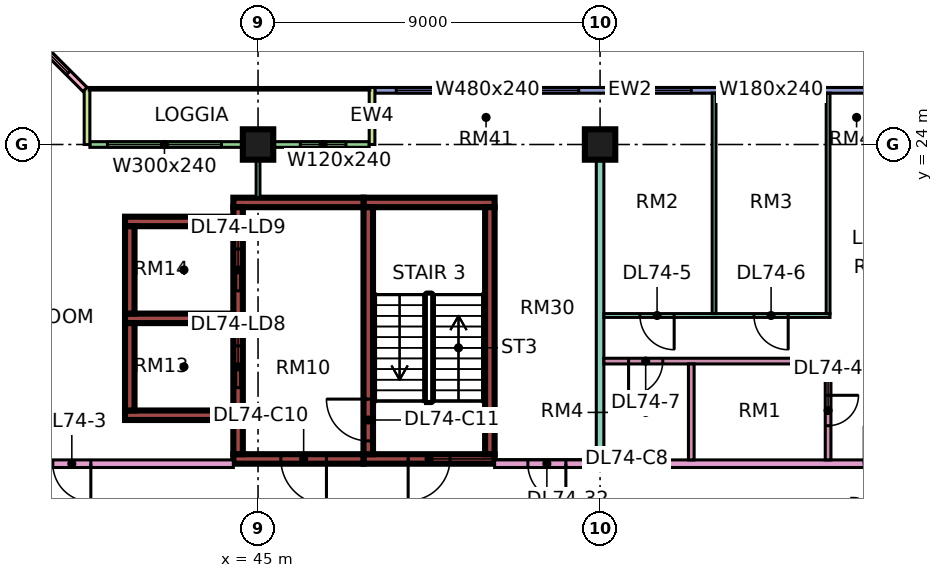
"""IFC4 building model, lengths in metres.
Left out: names, types, materials, properties, quantities, classifications, styles, units other than length and angle.
Written with IfcOpenShell. Run it as: python <this file> out.ifc"""

import sys

from ifc_helpers import new_model, si_unit, direction, frame, frame_2d, origin, origin_2d, place, context, subcontext, project, spatial, rectangle, extrude, element, fill, save


model = new_model("IFC4")
c1 = context("Model", 3, precision=1e-05, world=origin(), true_north=direction((0.0, 1.0)))
c2 = subcontext(c1, "Body", "Model", "MODEL_VIEW")
j1 = project(units=[si_unit("LENGTHUNIT", "METRE"), si_unit("PLANEANGLEUNIT", "RADIAN")], contexts=[c1])
p1 = place(None, origin())
s1 = spatial("IfcSite", under=j1, at=p1, CompositionType="ELEMENT")
p2 = place(p1, origin())
s2 = spatial("IfcBuilding", under=s1, at=p2, CompositionType="ELEMENT")
p3 = place(p2, frame((0.0, 0.0, 314.65)))
s3 = spatial("IfcBuildingStorey", under=s2, at=p3, CompositionType="ELEMENT", Elevation=314.65)
for number, where, z_axis, x_axis in (
    (1, (45.0, 24.0, 0.0), (0.0, 0.0, 1.0), (1.0, 0.0, 0.0)),
    (2, (54.0, 24.0, 0.0), (0.0, 0.0, 1.0), (1.0, 0.0, 0.0)),
):
    element("IfcColumn", number, at=place(p3, frame(where, z_axis=z_axis, x_axis=x_axis)), inside=s3, PredefinedType="COLUMN", context=c2, shape_type="SweptSolid", body=[
        extrude(rectangle(XDim=0.8, YDim=0.8, at=origin_2d()), origin(), (0.0, 0.0, 1.0), 3.75),
    ])
p4 = place(p3, frame((47.775, 15.725, 0.0), z_axis=(0.0, 0.0, 1.0), x_axis=(1.0, 0.0, 0.0)))
e3 = element("IfcWall", 3, at=p4, inside=s3, PredefinedType="SHEAR", context=c2, shape_type="SweptSolid", body=[
    extrude(rectangle(XDim=3.45, YDim=0.25, at=frame_2d((1.725, 0.0))), origin(), (0.0, 0.0, 1.0), 3.75),
])
p5 = place(p4, frame((1.175, 0.0, 0.0)))
e4 = element("IfcOpeningElement", 4, at=p5, cuts=e3, PredefinedType="OPENING", context=c2, shape_type="SweptSolid", body=[
    extrude(rectangle(XDim=1.1, YDim=2.2, at=frame_2d((0.55, 1.1))), frame((0.0, 0.135, 0.0), z_axis=(0.0, -1.0, 0.0), x_axis=(1.0, 0.0, 0.0)), (0.0, 0.0, 1.0), 0.27),
])
p6 = place(p3, frame((47.775, 22.475, 0.0), z_axis=(0.0, 0.0, 1.0), x_axis=(1.0, 0.0, 0.0)))
e5 = element("IfcWall", 5, at=p6, inside=s3, PredefinedType="SHEAR", context=c2, shape_type="SweptSolid", body=[
    extrude(rectangle(XDim=3.45, YDim=0.25, at=frame_2d((1.725, 0.0))), origin(), (0.0, 0.0, 1.0), 3.75),
])
p7 = place(p3, frame((47.9, 15.85, 0.0), z_axis=(0.0, 0.0, 1.0), x_axis=(0.0, 1.0, 0.0)))
e6 = element("IfcWall", 6, at=p7, inside=s3, PredefinedType="SHEAR", context=c2, shape_type="SweptSolid", body=[
    extrude(rectangle(XDim=6.5, YDim=0.25, at=frame_2d((3.25, 0.0))), origin(), (0.0, 0.0, 1.0), 3.75),
])
p8 = place(p7, frame((0.35, 0.0, 0.0)))
e7 = element("IfcOpeningElement", 7, at=p8, cuts=e6, PredefinedType="OPENING", context=c2, shape_type="SweptSolid", body=[
    extrude(rectangle(XDim=1.1, YDim=2.2, at=frame_2d((0.55, 1.1))), frame((0.0, 0.135, 0.0), z_axis=(0.0, -1.0, 0.0), x_axis=(1.0, 0.0, 0.0)), (0.0, 0.0, 1.0), 0.27),
])
p9 = place(p3, frame((51.1, 15.85, 0.0), z_axis=(0.0, 0.0, 1.0), x_axis=(0.0, 1.0, 0.0)))
e8 = element("IfcWall", 8, at=p9, inside=s3, PredefinedType="SHEAR", context=c2, shape_type="SweptSolid", body=[
    extrude(rectangle(XDim=6.5, YDim=0.25, at=frame_2d((3.25, 0.0))), origin(), (0.0, 0.0, 1.0), 3.75),
])
p10 = place(p3, frame((44.35, 15.725, 0.0), z_axis=(0.0, 0.0, 1.0), x_axis=(1.0, 0.0, 0.0)))
e9 = element("IfcWall", 9, at=p10, inside=s3, PredefinedType="SHEAR", context=c2, shape_type="SweptSolid", body=[
    extrude(rectangle(XDim=3.425, YDim=0.25, at=frame_2d((1.712, 0.0))), origin(), (0.0, 0.0, 1.0), 3.75),
])
p11 = place(p10, frame((1.25, 0.0, 0.0)))
e10 = element("IfcOpeningElement", 10, at=p11, cuts=e9, PredefinedType="OPENING", context=c2, shape_type="SweptSolid", body=[
    extrude(rectangle(XDim=1.2, YDim=2.2, at=frame_2d((0.6, 1.1))), frame((0.0, 0.135, 0.0), z_axis=(0.0, -1.0, 0.0), x_axis=(1.0, 0.0, 0.0)), (0.0, 0.0, 1.0), 0.27),
])
p12 = place(p3, frame((44.35, 22.475, 0.0), z_axis=(0.0, 0.0, 1.0), x_axis=(1.0, 0.0, 0.0)))
e11 = element("IfcWall", 11, at=p12, inside=s3, PredefinedType="SHEAR", context=c2, shape_type="SweptSolid", body=[
    extrude(rectangle(XDim=3.425, YDim=0.25, at=frame_2d((1.712, 0.0))), origin(), (0.0, 0.0, 1.0), 3.75),
])
p13 = place(p3, frame((44.475, 15.85, 0.0), z_axis=(0.0, 0.0, 1.0), x_axis=(0.0, 1.0, 0.0)))
e12 = element("IfcWall", 12, at=p13, inside=s3, PredefinedType="SHEAR", context=c2, shape_type="SweptSolid", body=[
    extrude(rectangle(XDim=6.5, YDim=0.25, at=frame_2d((3.25, 0.0))), origin(), (0.0, 0.0, 1.0), 3.75),
])
p14 = place(p13, frame((1.75, 0.0, 0.0)))
e13 = element("IfcOpeningElement", 13, at=p14, cuts=e12, PredefinedType="OPENING", context=c2, shape_type="SweptSolid", body=[
    extrude(rectangle(XDim=1.1, YDim=2.2, at=frame_2d((0.55, 1.1))), frame((0.0, 0.135, 0.0), z_axis=(0.0, -1.0, 0.0), x_axis=(1.0, 0.0, 0.0)), (0.0, 0.0, 1.0), 0.27),
])
p15 = place(p13, frame((4.3, 0.0, 0.0)))
e14 = element("IfcOpeningElement", 14, at=p15, cuts=e12, PredefinedType="OPENING", context=c2, shape_type="SweptSolid", body=[
    extrude(rectangle(XDim=1.1, YDim=2.2, at=frame_2d((0.55, 1.1))), frame((0.0, 0.135, 0.0), z_axis=(0.0, -1.0, 0.0), x_axis=(1.0, 0.0, 0.0)), (0.0, 0.0, 1.0), 0.27),
])
for number, where, z_axis, x_axis in (
    (15, (41.5, 16.875, 0.0), (0.0, 0.0, 1.0), (1.0, 0.0, 0.0)),
    (16, (41.5, 19.425, 0.0), (0.0, 0.0, 1.0), (1.0, 0.0, 0.0)),
    (17, (41.5, 21.975, 0.0), (0.0, 0.0, 1.0), (1.0, 0.0, 0.0)),
):
    element("IfcWall", number, at=place(p3, frame(where, z_axis=z_axis, x_axis=x_axis)), inside=s3, PredefinedType="SHEAR", context=c2, shape_type="SweptSolid", body=[
        extrude(rectangle(XDim=2.85, YDim=0.25, at=frame_2d((1.425, 0.0))), origin(), (0.0, 0.0, 1.0), 3.75),
    ])
for number, where, z_axis, x_axis in (
    (18, (41.625, 17.0, 0.0), (0.0, 0.0, 1.0), (0.0, 1.0, 0.0)),
    (19, (41.625, 19.55, 0.0), (0.0, 0.0, 1.0), (0.0, 1.0, 0.0)),
):
    element("IfcWall", number, at=place(p3, frame(where, z_axis=z_axis, x_axis=x_axis)), inside=s3, PredefinedType="SHEAR", context=c2, shape_type="SweptSolid", body=[
        extrude(rectangle(XDim=2.3, YDim=0.25, at=frame_2d((1.15, 0.0))), origin(), (0.0, 0.0, 1.0), 3.75),
    ])
p16 = place(p3, frame((61.5, 25.425, 0.0), z_axis=(0.0, 0.0, 1.0), x_axis=(-1.0, 0.0, 0.0)))
e20 = element("IfcWall", 20, at=p16, inside=s3, PredefinedType="SOLIDWALL", context=c2, shape_type="SweptSolid", body=[
    extrude(rectangle(XDim=13.425, YDim=0.15, at=frame_2d((6.712, 0.0))), origin(), (0.0, 0.0, 1.0), 3.35),
])
p17 = place(p16, frame((2.1, 0.0, 0.45)))
e21 = element("IfcOpeningElement", 21, at=p17, cuts=e20, PredefinedType="OPENING", context=c2, shape_type="SweptSolid", body=[
    extrude(rectangle(XDim=1.8, YDim=2.4, at=frame_2d((0.9, 1.2))), frame((0.0, 0.085, 0.0), z_axis=(0.0, -1.0, 0.0), x_axis=(1.0, 0.0, 0.0)), (0.0, 0.0, 1.0), 0.17),
])
p18 = place(p16, frame((5.1, 0.0, 0.45)))
e22 = element("IfcOpeningElement", 22, at=p18, cuts=e20, PredefinedType="OPENING", context=c2, shape_type="SweptSolid", body=[
    extrude(rectangle(XDim=1.8, YDim=2.4, at=frame_2d((0.9, 1.2))), frame((0.0, 0.085, 0.0), z_axis=(0.0, -1.0, 0.0), x_axis=(1.0, 0.0, 0.0)), (0.0, 0.0, 1.0), 0.17),
])
p19 = place(p16, frame((8.062, 0.0, 0.45)))
e23 = element("IfcOpeningElement", 23, at=p19, cuts=e20, PredefinedType="OPENING", context=c2, shape_type="SweptSolid", body=[
    extrude(rectangle(XDim=4.8, YDim=2.4, at=frame_2d((2.4, 1.2))), frame((0.0, 0.085, 0.0), z_axis=(0.0, -1.0, 0.0), x_axis=(1.0, 0.0, 0.0)), (0.0, 0.0, 1.0), 0.17),
])
p20 = place(p3, frame((47.925, 24.0, 0.0), z_axis=(0.0, 0.0, 1.0), x_axis=(-1.0, 0.0, 0.0)))
e24 = element("IfcWall", 24, at=p20, inside=s3, PredefinedType="SOLIDWALL", context=c2, shape_type="SweptSolid", body=[
    extrude(rectangle(XDim=7.35, YDim=0.15, at=frame_2d((3.675, 0.0))), origin(), (0.0, 0.0, 1.0), 3.35),
])
p21 = place(p20, frame((0.613, 0.0, 0.45)))
e25 = element("IfcOpeningElement", 25, at=p21, cuts=e24, PredefinedType="OPENING", context=c2, shape_type="SweptSolid", body=[
    extrude(rectangle(XDim=1.2, YDim=2.4, at=frame_2d((0.6, 1.2))), frame((0.0, 0.085, 0.0), z_axis=(0.0, -1.0, 0.0), x_axis=(1.0, 0.0, 0.0)), (0.0, 0.0, 1.0), 0.17),
])
p22 = place(p20, frame((3.887, 0.0, 0.45)))
e26 = element("IfcOpeningElement", 26, at=p22, cuts=e24, PredefinedType="OPENING", context=c2, shape_type="SweptSolid", body=[
    extrude(rectangle(XDim=3.0, YDim=2.4, at=frame_2d((1.5, 1.2))), frame((0.0, 0.085, 0.0), z_axis=(0.0, -1.0, 0.0), x_axis=(1.0, 0.0, 0.0)), (0.0, 0.0, 1.0), 0.17),
])
for number, where, z_axis, x_axis in (
    (27, (48.0, 25.5, 0.0), (0.0, 0.0, 1.0), (0.0, -1.0, 0.0)),
    (28, (40.5, 25.5, 0.0), (0.0, 0.0, 1.0), (0.0, -1.0, 0.0)),
):
    element("IfcWall", number, at=place(p3, frame(where, z_axis=z_axis, x_axis=x_axis)), inside=s3, PredefinedType="SOLIDWALL", context=c2, shape_type="SweptSolid", body=[
        extrude(rectangle(XDim=1.5, YDim=0.15, at=frame_2d((0.75, 0.0))), origin(), (0.0, 0.0, 1.0), 3.35),
    ])
p23 = place(p3, frame((40.447, 25.447, 0.0), z_axis=(0.0, 0.0, 1.0), x_axis=(-0.707106781187, 0.707106781187, 0.0)))
e29 = element("IfcWall", 29, at=p23, inside=s3, PredefinedType="SOLIDWALL", context=c2, shape_type="SweptSolid", body=[
    extrude(rectangle(XDim=4.243, YDim=0.15, at=frame_2d((2.121, 0.0))), origin(), (0.0, 0.0, 1.0), 3.35),
])
p24 = place(p23, frame((0.621, 0.0, 0.45)))
e30 = element("IfcOpeningElement", 30, at=p24, cuts=e29, PredefinedType="OPENING", context=c2, shape_type="SweptSolid", body=[
    extrude(rectangle(XDim=3.0, YDim=2.4, at=frame_2d((1.5, 1.2))), frame((0.0, 0.085, 0.0), z_axis=(0.0, -1.0, 0.0), x_axis=(1.0, 0.0, 0.0)), (0.0, 0.0, 1.0), 0.17),
])
p25 = place(p3, frame((34.0, 15.6, 0.0), z_axis=(0.0, 0.0, 1.0), x_axis=(1.0, 0.0, 0.0)))
e31 = element("IfcWall", 31, at=p25, inside=s3, PredefinedType="PARTITIONING", context=c2, shape_type="SweptSolid", body=[
    extrude(rectangle(XDim=10.35, YDim=0.2, at=frame_2d((5.175, 0.0))), origin(), (0.0, 0.0, 1.0), 3.35),
])
p26 = place(p25, frame((5.6, 0.0, 0.0)))
e32 = element("IfcOpeningElement", 32, at=p26, cuts=e31, PredefinedType="OPENING", context=c2, shape_type="SweptSolid", body=[
    extrude(rectangle(XDim=1.0, YDim=2.1, at=frame_2d((0.5, 1.05))), frame((0.0, 0.11, 0.0), z_axis=(0.0, -1.0, 0.0), x_axis=(1.0, 0.0, 0.0)), (0.0, 0.0, 1.0), 0.22),
])
p27 = place(p25, frame((0.45, 0.0, 0.0)))
e33 = element("IfcOpeningElement", 33, at=p27, cuts=e31, PredefinedType="OPENING", context=c2, shape_type="SweptSolid", body=[
    extrude(rectangle(XDim=1.2, YDim=2.1, at=frame_2d((0.6, 1.05))), frame((0.0, 0.11, 0.0), z_axis=(0.0, -1.0, 0.0), x_axis=(1.0, 0.0, 0.0)), (0.0, 0.0, 1.0), 0.22),
])
p28 = place(p3, frame((45.0, 22.6, 0.0), z_axis=(0.0, 0.0, 1.0), x_axis=(0.0, 1.0, 0.0)))
e34 = element("IfcWall", 34, at=p28, inside=s3, PredefinedType="PARTITIONING", context=c2, shape_type="SweptSolid", body=[
    extrude(rectangle(XDim=1.326, YDim=0.1, at=frame_2d((0.663, 0.0))), origin(), (0.0, 0.0, 1.0), 3.35),
])
p29 = place(p3, frame((51.225, 15.6, 0.0), z_axis=(0.0, 0.0, 1.0), x_axis=(1.0, 0.0, 0.0)))
e35 = element("IfcWall", 35, at=p29, inside=s3, PredefinedType="PARTITIONING", context=c2, shape_type="SweptSolid", body=[
    extrude(rectangle(XDim=11.701, YDim=0.2, at=frame_2d((5.851, 0.0))), origin(), (0.0, 0.0, 1.0), 3.35),
])
p30 = place(p29, frame((9.725, 0.0, 0.0)))
e36 = element("IfcOpeningElement", 36, at=p30, cuts=e35, PredefinedType="OPENING", context=c2, shape_type="SweptSolid", body=[
    extrude(rectangle(XDim=1.0, YDim=2.1, at=frame_2d((0.5, 1.05))), frame((0.0, 0.11, 0.0), z_axis=(0.0, -1.0, 0.0), x_axis=(1.0, 0.0, 0.0)), (0.0, 0.0, 1.0), 0.22),
])
p31 = place(p29, frame((0.875, 0.0, 0.0)))
e37 = element("IfcOpeningElement", 37, at=p31, cuts=e35, PredefinedType="OPENING", context=c2, shape_type="SweptSolid", body=[
    extrude(rectangle(XDim=1.0, YDim=2.1, at=frame_2d((0.5, 1.05))), frame((0.0, 0.11, 0.0), z_axis=(0.0, -1.0, 0.0), x_axis=(1.0, 0.0, 0.0)), (0.0, 0.0, 1.0), 0.22),
])
p32 = place(p3, frame((54.0, 15.7, 0.0), z_axis=(0.0, 0.0, 1.0), x_axis=(0.0, 1.0, 0.0)))
e38 = element("IfcWall", 38, at=p32, inside=s3, PredefinedType="PARTITIONING", context=c2, shape_type="SweptSolid", body=[
    extrude(rectangle(XDim=8.3, YDim=0.2, at=frame_2d((4.15, 0.0))), origin(), (0.0, 0.0, 1.0), 3.35),
])
p33 = place(p3, frame((54.1, 18.3, 0.0), z_axis=(0.0, 0.0, 1.0), x_axis=(1.0, 0.0, 0.0)))
e39 = element("IfcWall", 39, at=p33, inside=s3, PredefinedType="PARTITIONING", context=c2, shape_type="SweptSolid", body=[
    extrude(rectangle(XDim=5.975, YDim=0.15, at=frame_2d((2.987, 0.0))), origin(), (0.0, 0.0, 1.0), 3.35),
])
p34 = place(p33, frame((0.65, 0.0, 0.0)))
e40 = element("IfcOpeningElement", 40, at=p34, cuts=e39, PredefinedType="OPENING", context=c2, shape_type="SweptSolid", body=[
    extrude(rectangle(XDim=0.9, YDim=2.1, at=frame_2d((0.45, 1.05))), frame((0.0, 0.085, 0.0), z_axis=(0.0, -1.0, 0.0), x_axis=(1.0, 0.0, 0.0)), (0.0, 0.0, 1.0), 0.17),
])
p35 = place(p3, frame((54.1, 19.5, 0.0), z_axis=(0.0, 0.0, 1.0), x_axis=(1.0, 0.0, 0.0)))
e41 = element("IfcWall", 41, at=p35, inside=s3, PredefinedType="PARTITIONING", context=c2, shape_type="SweptSolid", body=[
    extrude(rectangle(XDim=5.95, YDim=0.1, at=frame_2d((2.975, 0.0))), origin(), (0.0, 0.0, 1.0), 3.35),
])
p36 = place(p35, frame((0.95, 0.0, 0.0)))
e42 = element("IfcOpeningElement", 42, at=p36, cuts=e41, PredefinedType="OPENING", context=c2, shape_type="SweptSolid", body=[
    extrude(rectangle(XDim=0.9, YDim=2.1, at=frame_2d((0.45, 1.05))), frame((0.0, 0.06, 0.0), z_axis=(0.0, -1.0, 0.0), x_axis=(1.0, 0.0, 0.0)), (0.0, 0.0, 1.0), 0.12),
])
p37 = place(p35, frame((3.95, 0.0, 0.0)))
e43 = element("IfcOpeningElement", 43, at=p37, cuts=e41, PredefinedType="OPENING", context=c2, shape_type="SweptSolid", body=[
    extrude(rectangle(XDim=0.9, YDim=2.1, at=frame_2d((0.45, 1.05))), frame((0.0, 0.06, 0.0), z_axis=(0.0, -1.0, 0.0), x_axis=(1.0, 0.0, 0.0)), (0.0, 0.0, 1.0), 0.12),
])
p38 = place(p3, frame((56.4, 15.7, 0.0), z_axis=(0.0, 0.0, 1.0), x_axis=(0.0, 1.0, 0.0)))
e44 = element("IfcWall", 44, at=p38, inside=s3, PredefinedType="PARTITIONING", context=c2, shape_type="SweptSolid", body=[
    extrude(rectangle(XDim=2.525, YDim=0.15, at=frame_2d((1.263, 0.0))), origin(), (0.0, 0.0, 1.0), 3.35),
])
p39 = place(p3, frame((57.0, 19.55, 0.0), z_axis=(0.0, 0.0, 1.0), x_axis=(0.0, 1.0, 0.0)))
e45 = element("IfcWall", 45, at=p39, inside=s3, PredefinedType="PARTITIONING", context=c2, shape_type="SweptSolid", body=[
    extrude(rectangle(XDim=5.801, YDim=0.1, at=frame_2d((2.9, 0.0))), origin(), (0.0, 0.0, 1.0), 3.35),
])
p40 = place(p3, frame((60.0, 15.7, 0.0), z_axis=(0.0, 0.0, 1.0), x_axis=(0.0, 1.0, 0.0)))
e46 = element("IfcWall", 46, at=p40, inside=s3, PredefinedType="PARTITIONING", context=c2, shape_type="SweptSolid", body=[
    extrude(rectangle(XDim=2.525, YDim=0.15, at=frame_2d((1.263, 0.0))), origin(), (0.0, 0.0, 1.0), 3.35),
])
p41 = place(p40, frame((0.9, 0.0, 0.0)))
e47 = element("IfcOpeningElement", 47, at=p41, cuts=e46, PredefinedType="OPENING", context=c2, shape_type="SweptSolid", body=[
    extrude(rectangle(XDim=0.8, YDim=2.1, at=frame_2d((0.4, 1.05))), frame((0.0, 0.085, 0.0), z_axis=(0.0, -1.0, 0.0), x_axis=(1.0, 0.0, 0.0)), (0.0, 0.0, 1.0), 0.17),
])
p42 = place(p3, frame((60.0, 19.55, 0.0), z_axis=(0.0, 0.0, 1.0), x_axis=(0.0, 1.0, 0.0)))
e48 = element("IfcWall", 48, at=p42, inside=s3, PredefinedType="PARTITIONING", context=c2, shape_type="SweptSolid", body=[
    extrude(rectangle(XDim=5.8, YDim=0.1, at=frame_2d((2.9, 0.0))), origin(), (0.0, 0.0, 1.0), 3.35),
])
p43 = place(p17, origin())
e49 = element("IfcWindow", 49, at=p43, inside=s3, PartitioningType="SINGLE_PANEL", PredefinedType="WINDOW", context=c2, shape_type="SweptSolid", body=[
    extrude(rectangle(XDim=1.8, YDim=2.4, at=frame_2d((0.9, 1.2))), frame((0.0, 0.03, 0.0), z_axis=(0.0, -1.0, 0.0), x_axis=(1.0, 0.0, 0.0)), (0.0, 0.0, 1.0), 0.06),
])
fill(e21, e49)
p44 = place(p18, origin())
e50 = element("IfcWindow", 50, at=p44, inside=s3, PartitioningType="SINGLE_PANEL", PredefinedType="WINDOW", context=c2, shape_type="SweptSolid", body=[
    extrude(rectangle(XDim=1.8, YDim=2.4, at=frame_2d((0.9, 1.2))), frame((0.0, 0.03, 0.0), z_axis=(0.0, -1.0, 0.0), x_axis=(1.0, 0.0, 0.0)), (0.0, 0.0, 1.0), 0.06),
])
fill(e22, e50)
p45 = place(p19, origin())
e51 = element("IfcWindow", 51, at=p45, inside=s3, PartitioningType="SINGLE_PANEL", PredefinedType="WINDOW", context=c2, shape_type="SweptSolid", body=[
    extrude(rectangle(XDim=4.8, YDim=2.4, at=frame_2d((2.4, 1.2))), frame((0.0, 0.03, 0.0), z_axis=(0.0, -1.0, 0.0), x_axis=(1.0, 0.0, 0.0)), (0.0, 0.0, 1.0), 0.06),
])
fill(e23, e51)
p46 = place(p21, origin())
e52 = element("IfcWindow", 52, at=p46, inside=s3, PartitioningType="SINGLE_PANEL", PredefinedType="WINDOW", context=c2, shape_type="SweptSolid", body=[
    extrude(rectangle(XDim=1.2, YDim=2.4, at=frame_2d((0.6, 1.2))), frame((0.0, 0.03, 0.0), z_axis=(0.0, -1.0, 0.0), x_axis=(1.0, 0.0, 0.0)), (0.0, 0.0, 1.0), 0.06),
])
fill(e25, e52)
p47 = place(p22, origin())
e53 = element("IfcWindow", 53, at=p47, inside=s3, PartitioningType="SINGLE_PANEL", PredefinedType="WINDOW", context=c2, shape_type="SweptSolid", body=[
    extrude(rectangle(XDim=3.0, YDim=2.4, at=frame_2d((1.5, 1.2))), frame((0.0, 0.03, 0.0), z_axis=(0.0, -1.0, 0.0), x_axis=(1.0, 0.0, 0.0)), (0.0, 0.0, 1.0), 0.06),
])
fill(e26, e53)
p48 = place(p24, origin())
e54 = element("IfcWindow", 54, at=p48, inside=s3, PartitioningType="SINGLE_PANEL", PredefinedType="WINDOW", context=c2, shape_type="SweptSolid", body=[
    extrude(rectangle(XDim=3.0, YDim=2.4, at=frame_2d((1.5, 1.2))), frame((0.0, 0.03, 0.0), z_axis=(0.0, -1.0, 0.0), x_axis=(1.0, 0.0, 0.0)), (0.0, 0.0, 1.0), 0.06),
])
fill(e30, e54)
p49 = place(p5, frame((1.1, 0.0, 0.0), z_axis=(0.0, 0.0, 1.0), x_axis=(-1.0, 0.0, 0.0)))
e55 = element("IfcDoor", 55, at=p49, inside=s3, OperationType="SINGLE_SWING_LEFT", PredefinedType="DOOR", context=c2, shape_type="SweptSolid", body=[
    extrude(rectangle(XDim=1.1, YDim=2.2, at=frame_2d((0.55, 1.1))), frame((0.0, 0.025, 0.0), z_axis=(0.0, -1.0, 0.0), x_axis=(1.0, 0.0, 0.0)), (0.0, 0.0, 1.0), 0.05),
])
fill(e4, e55)
p50 = place(p11, origin())
e56 = element("IfcDoor", 56, at=p50, inside=s3, OperationType="SINGLE_SWING_RIGHT", PredefinedType="DOOR", context=c2, shape_type="SweptSolid", body=[
    extrude(rectangle(XDim=1.2, YDim=2.2, at=frame_2d((0.6, 1.1))), frame((0.0, 0.025, 0.0), z_axis=(0.0, -1.0, 0.0), x_axis=(1.0, 0.0, 0.0)), (0.0, 0.0, 1.0), 0.05),
])
fill(e10, e56)
p51 = place(p8, frame((1.1, 0.0, 0.0), z_axis=(0.0, 0.0, 1.0), x_axis=(-1.0, 0.0, 0.0)))
e57 = element("IfcDoor", 57, at=p51, inside=s3, OperationType="SINGLE_SWING_RIGHT", PredefinedType="DOOR", context=c2, shape_type="SweptSolid", body=[
    extrude(rectangle(XDim=1.1, YDim=2.2, at=frame_2d((0.55, 1.1))), frame((0.0, 0.025, 0.0), z_axis=(0.0, -1.0, 0.0), x_axis=(1.0, 0.0, 0.0)), (0.0, 0.0, 1.0), 0.05),
])
fill(e7, e57)
p52 = place(p14, origin())
e58 = element("IfcDoor", 58, at=p52, inside=s3, OperationType="DOUBLE_DOOR_SLIDING", PredefinedType="DOOR", context=c2, shape_type="SweptSolid", body=[
    extrude(rectangle(XDim=1.1, YDim=2.2, at=frame_2d((0.55, 1.1))), frame((0.0, 0.025, 0.0), z_axis=(0.0, -1.0, 0.0), x_axis=(1.0, 0.0, 0.0)), (0.0, 0.0, 1.0), 0.05),
])
fill(e13, e58)
p53 = place(p15, origin())
e59 = element("IfcDoor", 59, at=p53, inside=s3, OperationType="DOUBLE_DOOR_SLIDING", PredefinedType="DOOR", context=c2, shape_type="SweptSolid", body=[
    extrude(rectangle(XDim=1.1, YDim=2.2, at=frame_2d((0.55, 1.1))), frame((0.0, 0.025, 0.0), z_axis=(0.0, -1.0, 0.0), x_axis=(1.0, 0.0, 0.0)), (0.0, 0.0, 1.0), 0.05),
])
fill(e14, e59)
p54 = place(p26, origin())
e60 = element("IfcDoor", 60, at=p54, inside=s3, OperationType="SINGLE_SWING_RIGHT", PredefinedType="DOOR", context=c2, shape_type="SweptSolid", body=[
    extrude(rectangle(XDim=1.0, YDim=2.1, at=frame_2d((0.5, 1.05))), frame((0.0, 0.025, 0.0), z_axis=(0.0, -1.0, 0.0), x_axis=(1.0, 0.0, 0.0)), (0.0, 0.0, 1.0), 0.05),
])
fill(e32, e60)
p55 = place(p41, origin())
e61 = element("IfcDoor", 61, at=p55, inside=s3, OperationType="SINGLE_SWING_RIGHT", PredefinedType="DOOR", context=c2, shape_type="SweptSolid", body=[
    extrude(rectangle(XDim=0.8, YDim=2.1, at=frame_2d((0.4, 1.05))), frame((0.0, 0.025, 0.0), z_axis=(0.0, -1.0, 0.0), x_axis=(1.0, 0.0, 0.0)), (0.0, 0.0, 1.0), 0.05),
])
fill(e47, e61)
p56 = place(p36, origin())
e62 = element("IfcDoor", 62, at=p56, inside=s3, OperationType="SINGLE_SWING_RIGHT", PredefinedType="DOOR", context=c2, shape_type="SweptSolid", body=[
    extrude(rectangle(XDim=0.9, YDim=2.1, at=frame_2d((0.45, 1.05))), frame((0.0, 0.025, 0.0), z_axis=(0.0, -1.0, 0.0), x_axis=(1.0, 0.0, 0.0)), (0.0, 0.0, 1.0), 0.05),
])
fill(e42, e62)
p57 = place(p37, origin())
e63 = element("IfcDoor", 63, at=p57, inside=s3, OperationType="SINGLE_SWING_RIGHT", PredefinedType="DOOR", context=c2, shape_type="SweptSolid", body=[
    extrude(rectangle(XDim=0.9, YDim=2.1, at=frame_2d((0.45, 1.05))), frame((0.0, 0.025, 0.0), z_axis=(0.0, -1.0, 0.0), x_axis=(1.0, 0.0, 0.0)), (0.0, 0.0, 1.0), 0.05),
])
fill(e43, e63)
p58 = place(p34, frame((0.9, 0.0, 0.0), z_axis=(0.0, 0.0, 1.0), x_axis=(-1.0, 0.0, 0.0)))
e64 = element("IfcDoor", 64, at=p58, inside=s3, OperationType="SINGLE_SWING_LEFT", PredefinedType="DOOR", context=c2, shape_type="SweptSolid", body=[
    extrude(rectangle(XDim=0.9, YDim=2.1, at=frame_2d((0.45, 1.05))), frame((0.0, 0.025, 0.0), z_axis=(0.0, -1.0, 0.0), x_axis=(1.0, 0.0, 0.0)), (0.0, 0.0, 1.0), 0.05),
])
fill(e40, e64)
p59 = place(p31, origin())
e65 = element("IfcDoor", 65, at=p59, inside=s3, OperationType="SINGLE_SWING_RIGHT", PredefinedType="DOOR", context=c2, shape_type="SweptSolid", body=[
    extrude(rectangle(XDim=1.0, YDim=2.1, at=frame_2d((0.5, 1.05))), frame((0.0, 0.025, 0.0), z_axis=(0.0, -1.0, 0.0), x_axis=(1.0, 0.0, 0.0)), (0.0, 0.0, 1.0), 0.05),
])
fill(e37, e65)
save(model, sys.argv[1])
